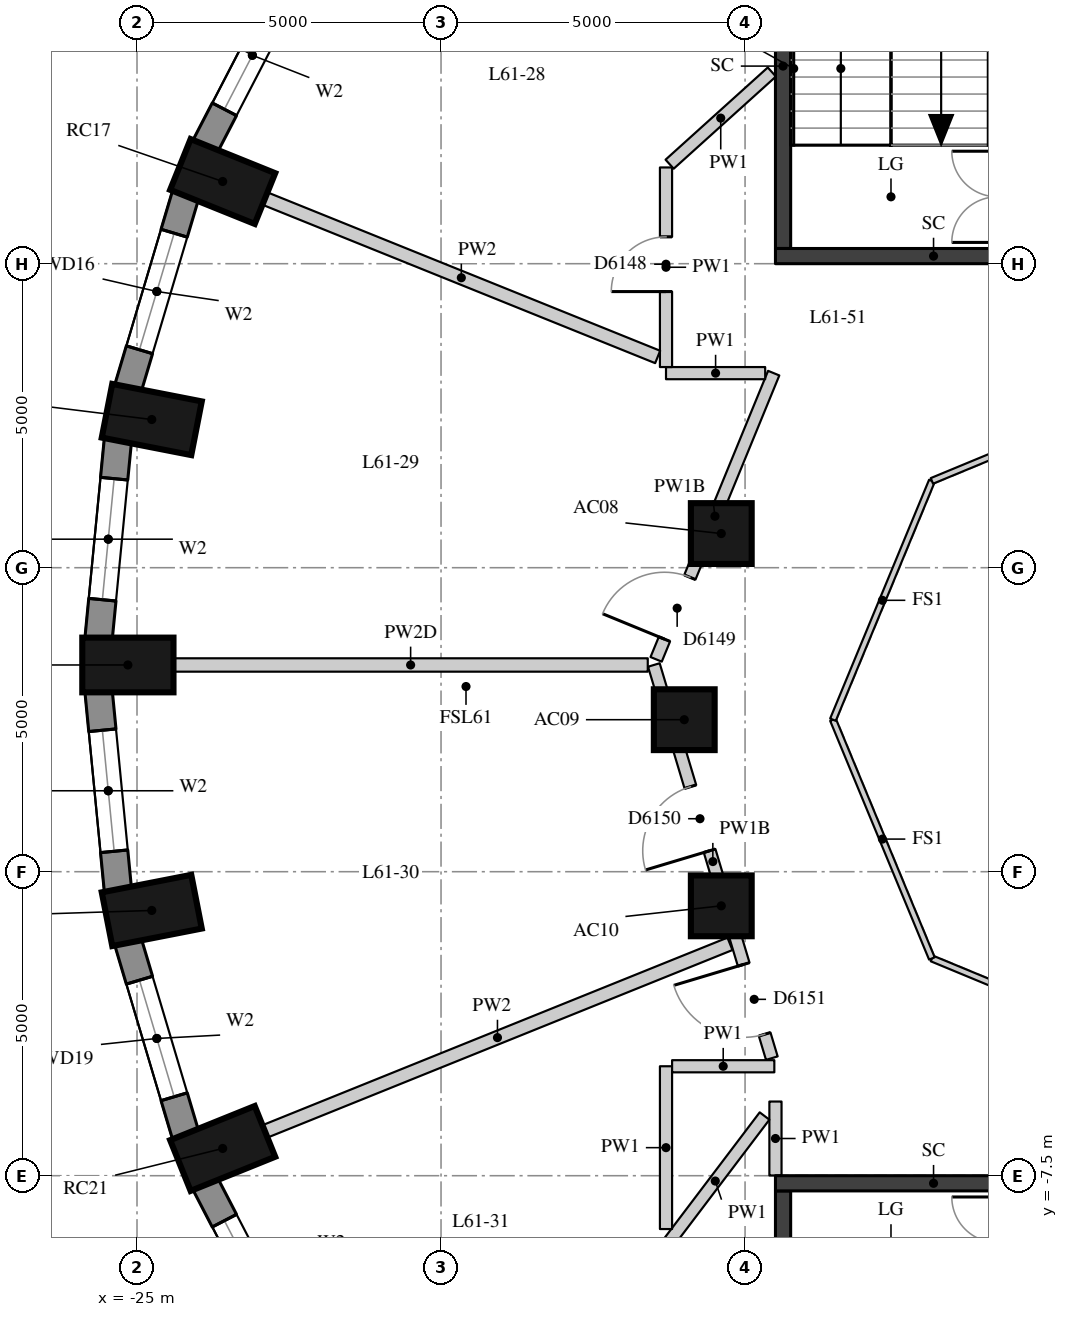
"""IFC4 building model, lengths in metres.
Left out: names, types, materials, properties, quantities, classifications, styles, units other than length and angle.
Written with IfcOpenShell. Run it as: python <this file> out.ifc"""

import sys

from ifc_helpers import new_model, si_unit, direction, frame, frame_2d, origin, origin_2d, place, context, subcontext, project, spatial, rectangle, extrude, element, fill, save


model = new_model("IFC4")
c1 = context("Model", 3, precision=1e-05, world=origin(), true_north=direction((0.0, 1.0)))
c2 = subcontext(c1, "Body", "Model", "MODEL_VIEW")
j1 = project(units=[si_unit("LENGTHUNIT", "METRE"), si_unit("PLANEANGLEUNIT", "RADIAN")], contexts=[c1])
p1 = place(None, origin())
s1 = spatial("IfcSite", under=j1, at=p1, CompositionType="ELEMENT")
p2 = place(p1, origin())
s2 = spatial("IfcBuilding", under=s1, at=p2, CompositionType="ELEMENT")
p3 = place(p2, frame((0.0, 0.0, 215.6)))
s3 = spatial("IfcBuildingStorey", under=s2, at=p3, CompositionType="ELEMENT", Elevation=215.6)
for number, where, z_axis, x_axis in (
    (1, (-23.591, 8.852, 0.0), (0.0, 0.0, 1.0), (-0.927, 0.374, 0.0)),
    (2, (-24.757, 4.937, 0.0), (0.0, 0.0, 1.0), (-0.981, 0.192, 0.0)),
    (3, (-25.15, 0.9, 0.0), (0.0, 0.0, 1.0), (-1.0, 0.0, 0.0)),
    (4, (-24.757, -3.137, 0.0), (0.0, 0.0, 1.0), (-0.981, -0.192, 0.0)),
    (5, (-23.591, -7.052, 0.0), (0.0, 0.0, 1.0), (-0.927, -0.374, 0.0)),
):
    element("IfcColumn", number, at=place(p3, frame(where, z_axis=z_axis, x_axis=x_axis)), inside=s3, PredefinedType="COLUMN", context=c2, shape_type="SweptSolid", body=[
        extrude(rectangle(XDim=1.5, YDim=0.9, at=origin_2d()), origin(), (0.0, 0.0, 1.0), 3.3),
    ])
for number, where, z_axis, x_axis in (
    (6, (-15.391, 3.062, 0.0), (0.0, 0.0, 1.0), (1.0, 0.0, 0.0)),
    (7, (-16.0, 0.0, 0.0), (0.0, 0.0, 1.0), (1.0, 0.0, 0.0)),
    (8, (-15.391, -3.062, 0.0), (0.0, 0.0, 1.0), (1.0, 0.0, 0.0)),
):
    element("IfcColumn", number, at=place(p3, frame(where, z_axis=z_axis, x_axis=x_axis)), inside=s3, PredefinedType="COLUMN", context=c2, shape_type="SweptSolid", body=[
        extrude(rectangle(XDim=1.0, YDim=1.0, at=origin_2d()), origin(), (0.0, 0.0, 1.0), 3.3),
    ])
p4 = place(p3, frame((-22.327, 12.424, 0.0), z_axis=(0.0, 0.0, 1.0), x_axis=(-0.460232593174, -0.887798378113, 0.0)))
e9 = element("IfcWall", 9, at=p4, inside=s3, PredefinedType="SOLIDWALL", context=c2, shape_type="SweptSolid", body=[
    extrude(rectangle(XDim=3.371, YDim=0.45, at=frame_2d((1.685, 0.0))), origin(), (0.0, 0.0, 1.0), 3.02),
])
p5 = place(p4, frame((0.685, 0.0, 0.4)))
e10 = element("IfcOpeningElement", 10, at=p5, cuts=e9, PredefinedType="OPENING", context=c2, shape_type="SweptSolid", body=[
    extrude(rectangle(XDim=2.0, YDim=1.75, at=frame_2d((1.0, 0.875))), frame((0.0, 0.235, 0.0), z_axis=(0.0, -1.0, 0.0), x_axis=(1.0, 0.0, 0.0)), (0.0, 0.0, 1.0), 0.47),
])
p6 = place(p3, frame((-24.2, 8.634, 0.0), z_axis=(0.0, 0.0, 1.0), x_axis=(-0.285444972963, -0.958395099847, 0.0)))
e11 = element("IfcWall", 11, at=p6, inside=s3, PredefinedType="SOLIDWALL", context=c2, shape_type="SweptSolid", body=[
    extrude(rectangle(XDim=3.32, YDim=0.45, at=frame_2d((1.66, 0.0))), origin(), (0.0, 0.0, 1.0), 3.02),
])
p7 = place(p6, frame((0.66, 0.0, 0.4)))
e12 = element("IfcOpeningElement", 12, at=p7, cuts=e11, PredefinedType="OPENING", context=c2, shape_type="SweptSolid", body=[
    extrude(rectangle(XDim=2.0, YDim=1.75, at=frame_2d((1.0, 0.875))), frame((0.0, 0.235, 0.0), z_axis=(0.0, -1.0, 0.0), x_axis=(1.0, 0.0, 0.0)), (0.0, 0.0, 1.0), 0.47),
])
p8 = place(p3, frame((-25.313, 4.608, 0.0), z_axis=(0.0, 0.0, 1.0), x_axis=(-0.096824116835, -0.995301507283, 0.0)))
e13 = element("IfcWall", 13, at=p8, inside=s3, PredefinedType="SOLIDWALL", context=c2, shape_type="SweptSolid", body=[
    extrude(rectangle(XDim=3.293, YDim=0.45, at=frame_2d((1.646, 0.0))), origin(), (0.0, 0.0, 1.0), 3.02),
])
p9 = place(p8, frame((0.646, 0.0, 0.4)))
e14 = element("IfcOpeningElement", 14, at=p9, cuts=e13, PredefinedType="OPENING", context=c2, shape_type="SweptSolid", body=[
    extrude(rectangle(XDim=2.0, YDim=1.75, at=frame_2d((1.0, 0.875))), frame((0.0, 0.235, 0.0), z_axis=(0.0, -1.0, 0.0), x_axis=(1.0, 0.0, 0.0)), (0.0, 0.0, 1.0), 0.47),
])
p10 = place(p3, frame((-25.632, 0.47, 0.0), z_axis=(0.0, 0.0, 1.0), x_axis=(0.096816972749, -0.995302202242, 0.0)))
e15 = element("IfcWall", 15, at=p10, inside=s3, PredefinedType="SOLIDWALL", context=c2, shape_type="SweptSolid", body=[
    extrude(rectangle(XDim=3.293, YDim=0.45, at=frame_2d((1.646, 0.0))), origin(), (0.0, 0.0, 1.0), 3.02),
])
p11 = place(p10, frame((0.646, 0.0, 0.4)))
e16 = element("IfcOpeningElement", 16, at=p11, cuts=e15, PredefinedType="OPENING", context=c2, shape_type="SweptSolid", body=[
    extrude(rectangle(XDim=2.0, YDim=1.75, at=frame_2d((1.0, 0.875))), frame((0.0, 0.235, 0.0), z_axis=(0.0, -1.0, 0.0), x_axis=(1.0, 0.0, 0.0)), (0.0, 0.0, 1.0), 0.47),
])
p12 = place(p3, frame((-25.148, -3.652, 0.0), z_axis=(0.0, 0.0, 1.0), x_axis=(0.285444972963, -0.958395099847, 0.0)))
e17 = element("IfcWall", 17, at=p12, inside=s3, PredefinedType="SOLIDWALL", context=c2, shape_type="SweptSolid", body=[
    extrude(rectangle(XDim=3.32, YDim=0.45, at=frame_2d((1.66, 0.0))), origin(), (0.0, 0.0, 1.0), 3.02),
])
p13 = place(p12, frame((0.66, 0.0, 0.4)))
e18 = element("IfcOpeningElement", 18, at=p13, cuts=e17, PredefinedType="OPENING", context=c2, shape_type="SweptSolid", body=[
    extrude(rectangle(XDim=2.0, YDim=1.75, at=frame_2d((1.0, 0.875))), frame((0.0, 0.235, 0.0), z_axis=(0.0, -1.0, 0.0), x_axis=(1.0, 0.0, 0.0)), (0.0, 0.0, 1.0), 0.47),
])
p14 = place(p3, frame((-23.878, -7.632, 0.0), z_axis=(0.0, 0.0, 1.0), x_axis=(0.460232593174, -0.887798378113, 0.0)))
e19 = element("IfcWall", 19, at=p14, inside=s3, PredefinedType="SOLIDWALL", context=c2, shape_type="SweptSolid", body=[
    extrude(rectangle(XDim=3.371, YDim=0.45, at=frame_2d((1.685, 0.0))), origin(), (0.0, 0.0, 1.0), 3.02),
])
p15 = place(p14, frame((0.685, 0.0, 0.4)))
e20 = element("IfcOpeningElement", 20, at=p15, cuts=e19, PredefinedType="OPENING", context=c2, shape_type="SweptSolid", body=[
    extrude(rectangle(XDim=2.0, YDim=1.75, at=frame_2d((1.0, 0.875))), frame((0.0, 0.235, 0.0), z_axis=(0.0, -1.0, 0.0), x_axis=(1.0, 0.0, 0.0)), (0.0, 0.0, 1.0), 0.47),
])
p16 = place(p3, frame((-14.375, 7.75, -0.28), z_axis=(0.0, 0.0, 1.0), x_axis=(0.0, 1.0, 0.0)))
e21 = element("IfcWall", 21, at=p16, inside=s3, PredefinedType="SHEAR", context=c2, shape_type="SweptSolid", body=[
    extrude(rectangle(XDim=6.0, YDim=0.25, at=frame_2d((3.0, 0.0))), origin(), (0.0, 0.0, 1.0), 3.3),
])
p17 = place(p3, frame((-14.5, 7.625, -0.28), z_axis=(0.0, 0.0, 1.0), x_axis=(1.0, 0.0, 0.0)))
e22 = element("IfcWall", 22, at=p17, inside=s3, PredefinedType="SHEAR", context=c2, shape_type="SweptSolid", body=[
    extrude(rectangle(XDim=5.2, YDim=0.25, at=frame_2d((2.6, 0.0))), origin(), (0.0, 0.0, 1.0), 3.3),
])
p18 = place(p3, frame((-14.375, -13.75, -0.28), z_axis=(0.0, 0.0, 1.0), x_axis=(0.0, 1.0, 0.0)))
e23 = element("IfcWall", 23, at=p18, inside=s3, PredefinedType="SHEAR", context=c2, shape_type="SweptSolid", body=[
    extrude(rectangle(XDim=6.0, YDim=0.25, at=frame_2d((3.0, 0.0))), origin(), (0.0, 0.0, 1.0), 3.3),
])
p19 = place(p3, frame((-14.5, -7.625, -0.28), z_axis=(0.0, 0.0, 1.0), x_axis=(1.0, 0.0, 0.0)))
e24 = element("IfcWall", 24, at=p19, inside=s3, PredefinedType="SHEAR", context=c2, shape_type="SweptSolid", body=[
    extrude(rectangle(XDim=5.2, YDim=0.25, at=frame_2d((2.6, 0.0))), origin(), (0.0, 0.0, 1.0), 3.3),
])
p20 = place(p3, frame((-14.5, -7.496, 0.0), z_axis=(0.0, 0.0, 1.0), x_axis=(0.0, 1.0, 0.0)))
e25 = element("IfcWall", 25, at=p20, inside=s3, PredefinedType="PARTITIONING", context=c2, shape_type="SweptSolid", body=[
    extrude(rectangle(XDim=1.216, YDim=0.2, at=frame_2d((0.608, 0.0))), origin(), (0.0, 0.0, 1.0), 3.02),
])
p21 = place(p3, frame((-14.679, -6.518, 0.0), z_axis=(0.0, 0.0, 1.0), x_axis=(-0.603820908912, -0.797120009761, 0.0)))
e26 = element("IfcWall", 26, at=p21, inside=s3, PredefinedType="PARTITIONING", context=c2, shape_type="SweptSolid", body=[
    extrude(rectangle(XDim=2.684, YDim=0.2, at=frame_2d((1.342, 0.0))), origin(), (0.0, 0.0, 1.0), 3.02),
])
p22 = place(p3, frame((-16.3, -8.377, 0.0), z_axis=(0.0, 0.0, 1.0), x_axis=(0.0, 1.0, 0.0)))
e27 = element("IfcWall", 27, at=p22, inside=s3, PredefinedType="PARTITIONING", context=c2, shape_type="SweptSolid", body=[
    extrude(rectangle(XDim=2.677, YDim=0.2, at=frame_2d((1.339, 0.0))), origin(), (0.0, 0.0, 1.0), 3.02),
])
p23 = place(p3, frame((-16.2, -5.7, 0.0), z_axis=(0.0, 0.0, 1.0), x_axis=(1.0, 0.0, 0.0)))
e28 = element("IfcWall", 28, at=p23, inside=s3, PredefinedType="PARTITIONING", context=c2, shape_type="SweptSolid", body=[
    extrude(rectangle(XDim=1.681, YDim=0.2, at=frame_2d((0.841, 0.0))), origin(), (0.0, 0.0, 1.0), 3.02),
])
p24 = place(p3, frame((-14.56, -5.567, 0.0), z_axis=(0.0, 0.0, 1.0), x_axis=(-0.287410918602, 0.95780737305, 0.0)))
e29 = element("IfcWall", 29, at=p24, inside=s3, PredefinedType="PARTITIONING", context=c2, shape_type="SweptSolid", body=[
    extrude(rectangle(XDim=6.751, YDim=0.2, at=frame_2d((3.376, 0.0))), origin(), (0.0, 0.0, 1.0), 2.52),
])
p25 = place(p24, frame((3.561, 0.0, 0.0)))
e30 = element("IfcOpeningElement", 30, at=p25, cuts=e29, PredefinedType="OPENING", context=c2, shape_type="SweptSolid", body=[
    extrude(rectangle(XDim=1.1, YDim=2.1, at=frame_2d((0.55, 1.05))), frame((0.0, 0.11, 0.0), z_axis=(0.0, -1.0, 0.0), x_axis=(1.0, 0.0, 0.0)), (0.0, 0.0, 1.0), 0.22),
])
p26 = place(p24, frame((0.41, 0.0, 0.0)))
e31 = element("IfcOpeningElement", 31, at=p26, cuts=e29, PredefinedType="OPENING", context=c2, shape_type="SweptSolid", body=[
    extrude(rectangle(XDim=1.2, YDim=2.1, at=frame_2d((0.6, 1.05))), frame((0.0, 0.11, 0.0), z_axis=(0.0, -1.0, 0.0), x_axis=(1.0, 0.0, 0.0)), (0.0, 0.0, 1.0), 0.22),
])
p27 = place(p3, frame((-16.462, 0.993, 0.0), z_axis=(0.0, 0.0, 1.0), x_axis=(0.37991958703, 0.925019517303, 0.0)))
e32 = element("IfcWall", 32, at=p27, inside=s3, PredefinedType="PARTITIONING", context=c2, shape_type="SweptSolid", body=[
    extrude(rectangle(XDim=5.089, YDim=0.2, at=frame_2d((2.544, 0.0))), origin(), (0.0, 0.0, 1.0), 2.52),
])
p28 = place(p27, frame((0.36, 0.0, 0.0)))
e33 = element("IfcOpeningElement", 33, at=p28, cuts=e32, PredefinedType="OPENING", context=c2, shape_type="SweptSolid", body=[
    extrude(rectangle(XDim=1.1, YDim=2.1, at=frame_2d((0.55, 1.05))), frame((0.0, 0.11, 0.0), z_axis=(0.0, -1.0, 0.0), x_axis=(1.0, 0.0, 0.0)), (0.0, 0.0, 1.0), 0.22),
])
p29 = place(p3, frame((-14.669, 5.7, 0.0), z_axis=(0.0, 0.0, 1.0), x_axis=(-1.0, 0.0, 0.0)))
e34 = element("IfcWall", 34, at=p29, inside=s3, PredefinedType="PARTITIONING", context=c2, shape_type="SweptSolid", body=[
    extrude(rectangle(XDim=1.631, YDim=0.2, at=frame_2d((0.815, 0.0))), origin(), (0.0, 0.0, 1.0), 3.02),
])
p30 = place(p3, frame((-16.3, 5.8, 0.0), z_axis=(0.0, 0.0, 1.0), x_axis=(0.0, 1.0, 0.0)))
e35 = element("IfcWall", 35, at=p30, inside=s3, PredefinedType="PARTITIONING", context=c2, shape_type="SweptSolid", body=[
    extrude(rectangle(XDim=3.283, YDim=0.2, at=frame_2d((1.641, 0.0))), origin(), (0.0, 0.0, 1.0), 3.02),
])
p31 = place(p30, frame((1.241, 0.0, 0.0)))
e36 = element("IfcOpeningElement", 36, at=p31, cuts=e35, PredefinedType="OPENING", context=c2, shape_type="SweptSolid", body=[
    extrude(rectangle(XDim=0.9, YDim=2.1, at=frame_2d((0.45, 1.05))), frame((0.0, 0.11, 0.0), z_axis=(0.0, -1.0, 0.0), x_axis=(1.0, 0.0, 0.0)), (0.0, 0.0, 1.0), 0.22),
])
p32 = place(p3, frame((-16.24, 9.136, 0.0), z_axis=(0.0, 0.0, 1.0), x_axis=(0.74251608424, 0.66982823518, 0.0)))
e37 = element("IfcWall", 37, at=p32, inside=s3, PredefinedType="PARTITIONING", context=c2, shape_type="SweptSolid", body=[
    extrude(rectangle(XDim=2.264, YDim=0.2, at=frame_2d((1.132, 0.0))), origin(), (0.0, 0.0, 1.0), 3.02),
])
p33 = place(p3, frame((-22.896, 8.571, 0.0), z_axis=(0.0, 0.0, 1.0), x_axis=(0.927387137769, -0.374103056256, 0.0)))
e38 = element("IfcWall", 38, at=p33, inside=s3, PredefinedType="PARTITIONING", context=c2, shape_type="SweptSolid", body=[
    extrude(rectangle(XDim=6.964, YDim=0.22, at=frame_2d((3.482, 0.0))), origin(), (0.0, 0.0, 1.0), 3.02),
])
p34 = place(p3, frame((-24.4, 0.9, 0.0), z_axis=(0.0, 0.0, 1.0), x_axis=(1.0, 0.0, 0.0)))
e39 = element("IfcWall", 39, at=p34, inside=s3, PredefinedType="PARTITIONING", context=c2, shape_type="SweptSolid", body=[
    extrude(rectangle(XDim=7.8, YDim=0.22, at=frame_2d((3.9, 0.0))), origin(), (0.0, 0.0, 1.0), 2.47),
])
p35 = place(p3, frame((-22.896, -6.771, 0.0), z_axis=(0.0, 0.0, 1.0), x_axis=(0.92738233242, 0.374114968313, 0.0)))
e40 = element("IfcWall", 40, at=p35, inside=s3, PredefinedType="PARTITIONING", context=c2, shape_type="SweptSolid", body=[
    extrude(rectangle(XDim=8.246, YDim=0.22, at=frame_2d((4.123, 0.0))), origin(), (0.0, 0.0, 1.0), 3.02),
])
for number, where, z_axis, x_axis in (
    (41, (-8.0, -5.554, 0.0), (0.0, 0.0, 1.0), (-0.924, 0.383, 0.0)),
    (42, (-11.927, -3.927, 0.0), (0.0, 0.0, 1.0), (-0.383, 0.924, 0.0)),
    (43, (-13.554, 0.0, 0.0), (0.0, 0.0, 1.0), (0.383, 0.924, 0.0)),
    (44, (-11.927, 3.927, 0.0), (0.0, 0.0, 1.0), (0.924, 0.383, 0.0)),
):
    element("IfcWall", number, at=place(p3, frame(where, z_axis=z_axis, x_axis=x_axis)), inside=s3, PredefinedType="PARTITIONING", context=c2, shape_type="SweptSolid", body=[
        extrude(rectangle(XDim=4.251, YDim=0.1, at=frame_2d((2.125, 0.0))), origin(), (0.0, 0.0, 1.0), 3.02),
    ])
p36 = place(p5, origin())
e45 = element("IfcWindow", 45, at=p36, inside=s3, PartitioningType="SINGLE_PANEL", PredefinedType="WINDOW", context=c2, shape_type="SweptSolid", body=[
    extrude(rectangle(XDim=2.0, YDim=1.75, at=frame_2d((1.0, 0.875))), frame((0.0, 0.035, 0.0), z_axis=(0.0, -1.0, 0.0), x_axis=(1.0, 0.0, 0.0)), (0.0, 0.0, 1.0), 0.06),
])
fill(e10, e45)
p37 = place(p7, origin())
e46 = element("IfcWindow", 46, at=p37, inside=s3, PartitioningType="SINGLE_PANEL", PredefinedType="WINDOW", context=c2, shape_type="SweptSolid", body=[
    extrude(rectangle(XDim=2.0, YDim=1.75, at=frame_2d((1.0, 0.875))), frame((0.0, 0.035, 0.0), z_axis=(0.0, -1.0, 0.0), x_axis=(1.0, 0.0, 0.0)), (0.0, 0.0, 1.0), 0.06),
])
fill(e12, e46)
p38 = place(p9, origin())
e47 = element("IfcWindow", 47, at=p38, inside=s3, PartitioningType="SINGLE_PANEL", PredefinedType="WINDOW", context=c2, shape_type="SweptSolid", body=[
    extrude(rectangle(XDim=2.0, YDim=1.75, at=frame_2d((1.0, 0.875))), frame((0.0, 0.035, 0.0), z_axis=(0.0, -1.0, 0.0), x_axis=(1.0, 0.0, 0.0)), (0.0, 0.0, 1.0), 0.06),
])
fill(e14, e47)
p39 = place(p11, origin())
e48 = element("IfcWindow", 48, at=p39, inside=s3, PartitioningType="SINGLE_PANEL", PredefinedType="WINDOW", context=c2, shape_type="SweptSolid", body=[
    extrude(rectangle(XDim=2.0, YDim=1.75, at=frame_2d((1.0, 0.875))), frame((0.0, 0.035, 0.0), z_axis=(0.0, -1.0, 0.0), x_axis=(1.0, 0.0, 0.0)), (0.0, 0.0, 1.0), 0.06),
])
fill(e16, e48)
p40 = place(p13, origin())
e49 = element("IfcWindow", 49, at=p40, inside=s3, PartitioningType="SINGLE_PANEL", PredefinedType="WINDOW", context=c2, shape_type="SweptSolid", body=[
    extrude(rectangle(XDim=2.0, YDim=1.75, at=frame_2d((1.0, 0.875))), frame((0.0, 0.035, 0.0), z_axis=(0.0, -1.0, 0.0), x_axis=(1.0, 0.0, 0.0)), (0.0, 0.0, 1.0), 0.06),
])
fill(e18, e49)
p41 = place(p15, origin())
e50 = element("IfcWindow", 50, at=p41, inside=s3, PartitioningType="SINGLE_PANEL", PredefinedType="WINDOW", context=c2, shape_type="SweptSolid", body=[
    extrude(rectangle(XDim=2.0, YDim=1.75, at=frame_2d((1.0, 0.875))), frame((0.0, 0.035, 0.0), z_axis=(0.0, -1.0, 0.0), x_axis=(1.0, 0.0, 0.0)), (0.0, 0.0, 1.0), 0.06),
])
fill(e20, e50)
p42 = place(p31, origin())
e51 = element("IfcDoor", 51, at=p42, inside=s3, OperationType="SINGLE_SWING_LEFT", PredefinedType="DOOR", context=c2, shape_type="SweptSolid", body=[
    extrude(rectangle(XDim=0.9, YDim=2.1, at=frame_2d((0.45, 1.05))), frame((0.0, 0.025, 0.0), z_axis=(0.0, -1.0, 0.0), x_axis=(1.0, 0.0, 0.0)), (0.0, 0.0, 1.0), 0.05),
])
fill(e36, e51)
p43 = place(p28, origin())
e52 = element("IfcDoor", 52, at=p43, inside=s3, OperationType="SINGLE_SWING_LEFT", PredefinedType="DOOR", context=c2, shape_type="SweptSolid", body=[
    extrude(rectangle(XDim=1.1, YDim=2.1, at=frame_2d((0.55, 1.05))), frame((0.0, 0.025, 0.0), z_axis=(0.0, -1.0, 0.0), x_axis=(1.0, 0.0, 0.0)), (0.0, 0.0, 1.0), 0.05),
])
fill(e33, e52)
p44 = place(p25, origin())
e53 = element("IfcDoor", 53, at=p44, inside=s3, OperationType="SINGLE_SWING_LEFT", PredefinedType="DOOR", context=c2, shape_type="SweptSolid", body=[
    extrude(rectangle(XDim=1.1, YDim=2.1, at=frame_2d((0.55, 1.05))), frame((0.0, 0.025, 0.0), z_axis=(0.0, -1.0, 0.0), x_axis=(1.0, 0.0, 0.0)), (0.0, 0.0, 1.0), 0.05),
])
fill(e30, e53)
p45 = place(p26, origin())
e54 = element("IfcDoor", 54, at=p45, inside=s3, OperationType="SINGLE_SWING_RIGHT", PredefinedType="DOOR", context=c2, shape_type="SweptSolid", body=[
    extrude(rectangle(XDim=1.2, YDim=2.1, at=frame_2d((0.6, 1.05))), frame((0.0, 0.025, 0.0), z_axis=(0.0, -1.0, 0.0), x_axis=(1.0, 0.0, 0.0)), (0.0, 0.0, 1.0), 0.05),
])
fill(e31, e54)
save(model, sys.argv[1])
